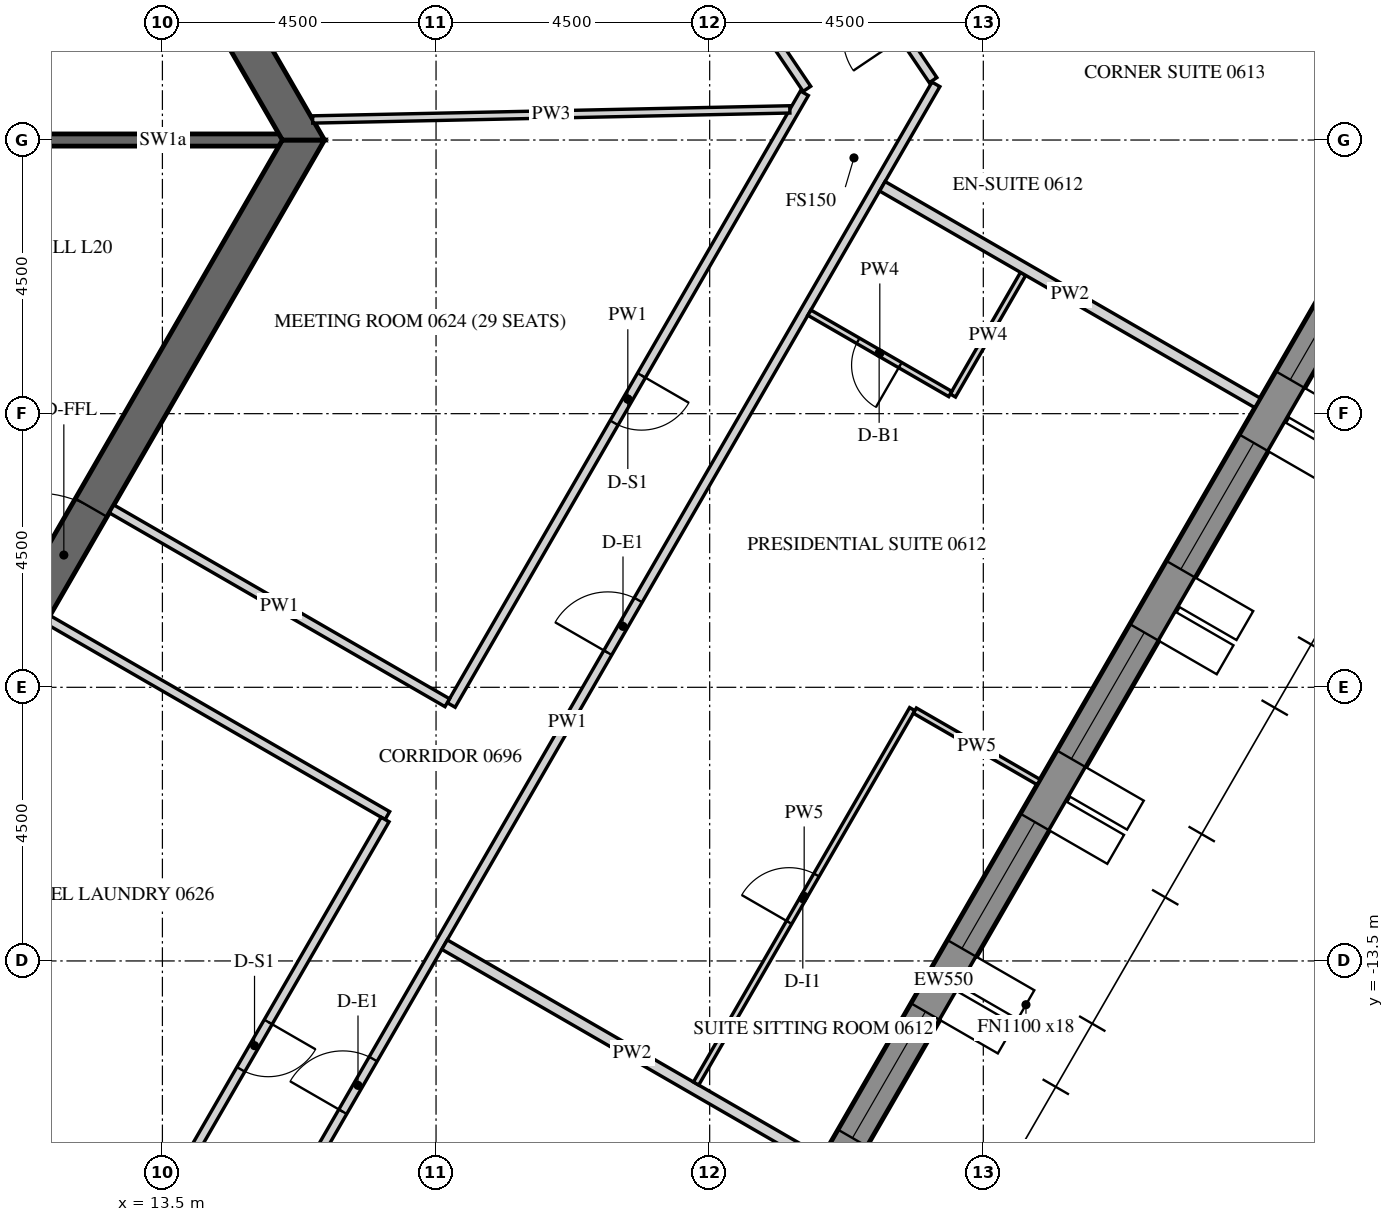
"""IFC4 building model, lengths in metres.
Left out: names, types, materials, properties, quantities, classifications, styles, units other than length and angle.
Written with IfcOpenShell. Run it as: python <this file> out.ifc"""

import sys

from ifc_helpers import new_model, si_unit, direction, frame, frame_2d, origin, place, context, subcontext, project, spatial, polyline, rectangle, outline, extrude, element, fill, save


model = new_model("IFC4")
c1 = context("Model", 3, precision=1e-05, world=origin(), true_north=direction((0.0, 1.0)))
c2 = subcontext(c1, "Body", "Model", "MODEL_VIEW")
j1 = project(units=[si_unit("LENGTHUNIT", "METRE"), si_unit("PLANEANGLEUNIT", "RADIAN")], contexts=[c1])
p1 = place(None, origin())
s1 = spatial("IfcSite", under=j1, at=p1, CompositionType="ELEMENT")
p2 = place(p1, origin())
s2 = spatial("IfcBuilding", under=s1, at=p2, CompositionType="ELEMENT")
p3 = place(p2, frame((0.0, 0.0, 92.1)))
s3 = spatial("IfcBuildingStorey", under=s2, at=p3, CompositionType="ELEMENT", Elevation=92.1)
p4 = place(p3, frame((18.83, -26.835, -0.15), z_axis=(0.0, 0.0, 1.0), x_axis=(0.500003800416, 0.866023209602, 0.0)))
e1 = element("IfcWall", 1, at=p4, inside=s3, PredefinedType="SOLIDWALL", context=c2, shape_type="SweptSolid", body=[
    extrude(outline(polyline([(-0.022, -0.275), (30.097, -0.275), (30.045, 0.275), (0.022, 0.275), (-0.022, -0.275)])), origin(), (0.0, 0.0, 1.0), 3.9),
])
p5 = place(p4, frame((1.236, 0.0, 1.05)))
e2 = element("IfcOpeningElement", 2, at=p5, cuts=e1, PredefinedType="OPENING", context=c2, shape_type="SweptSolid", body=[
    extrude(rectangle(XDim=2.4, YDim=2.4, at=frame_2d((1.2, 1.2))), frame((0.0, 0.285, 0.0), z_axis=(0.0, -1.0, 0.0), x_axis=(1.0, 0.0, 0.0)), (0.0, 0.0, 1.0), 0.57),
])
p6 = place(p4, frame((4.835, 0.0, 1.05)))
e3 = element("IfcOpeningElement", 3, at=p6, cuts=e1, PredefinedType="OPENING", context=c2, shape_type="SweptSolid", body=[
    extrude(rectangle(XDim=2.4, YDim=2.4, at=frame_2d((1.2, 1.2))), frame((0.0, 0.285, 0.0), z_axis=(0.0, -1.0, 0.0), x_axis=(1.0, 0.0, 0.0)), (0.0, 0.0, 1.0), 0.57),
])
p7 = place(p4, frame((8.436, 0.0, 1.05)))
e4 = element("IfcOpeningElement", 4, at=p7, cuts=e1, PredefinedType="OPENING", context=c2, shape_type="SweptSolid", body=[
    extrude(rectangle(XDim=2.4, YDim=2.4, at=frame_2d((1.2, 1.2))), frame((0.0, 0.285, 0.0), z_axis=(0.0, -1.0, 0.0), x_axis=(1.0, 0.0, 0.0)), (0.0, 0.0, 1.0), 0.57),
])
p8 = place(p4, frame((12.035, 0.0, 1.05)))
e5 = element("IfcOpeningElement", 5, at=p8, cuts=e1, PredefinedType="OPENING", context=c2, shape_type="SweptSolid", body=[
    extrude(rectangle(XDim=2.4, YDim=2.4, at=frame_2d((1.2, 1.2))), frame((0.0, 0.285, 0.0), z_axis=(0.0, -1.0, 0.0), x_axis=(1.0, 0.0, 0.0)), (0.0, 0.0, 1.0), 0.57),
])
p9 = place(p4, frame((15.635, 0.0, 1.05)))
e6 = element("IfcOpeningElement", 6, at=p9, cuts=e1, PredefinedType="OPENING", context=c2, shape_type="SweptSolid", body=[
    extrude(rectangle(XDim=2.4, YDim=2.4, at=frame_2d((1.2, 1.2))), frame((0.0, 0.285, 0.0), z_axis=(0.0, -1.0, 0.0), x_axis=(1.0, 0.0, 0.0)), (0.0, 0.0, 1.0), 0.57),
])
p10 = place(p4, frame((19.236, 0.0, 1.05)))
e7 = element("IfcOpeningElement", 7, at=p10, cuts=e1, PredefinedType="OPENING", context=c2, shape_type="SweptSolid", body=[
    extrude(rectangle(XDim=2.4, YDim=2.4, at=frame_2d((1.2, 1.2))), frame((0.0, 0.285, 0.0), z_axis=(0.0, -1.0, 0.0), x_axis=(1.0, 0.0, 0.0)), (0.0, 0.0, 1.0), 0.57),
])
p11 = place(p4, frame((22.835, 0.0, 1.05)))
e8 = element("IfcOpeningElement", 8, at=p11, cuts=e1, PredefinedType="OPENING", context=c2, shape_type="SweptSolid", body=[
    extrude(rectangle(XDim=2.4, YDim=2.4, at=frame_2d((1.2, 1.2))), frame((0.0, 0.285, 0.0), z_axis=(0.0, -1.0, 0.0), x_axis=(1.0, 0.0, 0.0)), (0.0, 0.0, 1.0), 0.57),
])
p12 = place(p4, frame((26.436, 0.0, 1.05)))
e9 = element("IfcOpeningElement", 9, at=p12, cuts=e1, PredefinedType="OPENING", context=c2, shape_type="SweptSolid", body=[
    extrude(rectangle(XDim=2.4, YDim=2.4, at=frame_2d((1.2, 1.2))), frame((0.0, 0.285, 0.0), z_axis=(0.0, -1.0, 0.0), x_axis=(1.0, 0.0, 0.0)), (0.0, 0.0, 1.0), 0.57),
])
p13 = place(p3, frame((7.91, -13.7, -0.15), z_axis=(0.0, 0.0, 1.0), x_axis=(0.499999880136, 0.866025472988, 0.0)))
e10 = element("IfcWall", 10, at=p13, inside=s3, PredefinedType="SHEAR", context=c2, shape_type="SweptSolid", body=[
    extrude(outline(polyline([(-0.173, -0.3), (15.993, -0.3), (15.646, 0.3), (0.173, 0.3), (-0.173, -0.3)])), origin(), (0.0, 0.0, 1.0), 3.9),
])
p14 = place(p13, frame((7.039, 0.0, 0.15)))
e11 = element("IfcOpeningElement", 11, at=p14, cuts=e10, PredefinedType="OPENING", context=c2, shape_type="SweptSolid", body=[
    extrude(rectangle(XDim=1.8, YDim=2.4, at=frame_2d((0.9, 1.2))), frame((0.0, 0.31, 0.0), z_axis=(0.0, -1.0, 0.0), x_axis=(1.0, 0.0, 0.0)), (0.0, 0.0, 1.0), 0.62),
])
p15 = place(p3, frame((15.819, 0.0, -0.15), z_axis=(0.0, 0.0, 1.0), x_axis=(-0.499999880136, 0.866025472988, 0.0)))
e12 = element("IfcWall", 12, at=p15, inside=s3, PredefinedType="SHEAR", context=c2, shape_type="SweptSolid", body=[
    extrude(outline(polyline([(-0.173, -0.3), (15.993, -0.3), (15.646, 0.3), (0.173, 0.3), (-0.173, -0.3)])), origin(), (0.0, 0.0, 1.0), 3.9),
])
p16 = place(p15, frame((6.981, 0.0, 0.15)))
e13 = element("IfcOpeningElement", 13, at=p16, cuts=e12, PredefinedType="OPENING", context=c2, shape_type="SweptSolid", body=[
    extrude(rectangle(XDim=1.8, YDim=2.4, at=frame_2d((0.9, 1.2))), frame((0.0, 0.31, 0.0), z_axis=(0.0, -1.0, 0.0), x_axis=(1.0, 0.0, 0.0)), (0.0, 0.0, 1.0), 0.62),
])
p17 = place(p3, frame((8.083, -14.0, -0.15), z_axis=(0.0, 0.0, 1.0), x_axis=(0.499997680643, -0.866026742862, 0.0)))
e14 = element("IfcWall", 14, at=p17, inside=s3, PredefinedType="SHEAR", context=c2, shape_type="SweptSolid", body=[
    extrude(rectangle(XDim=16.509, YDim=0.6, at=frame_2d((8.254, 0.0))), origin(), (0.0, 0.0, 1.0), 3.9),
])
p18 = place(p17, frame((7.354, 0.0, 0.15)))
e15 = element("IfcOpeningElement", 15, at=p18, cuts=e14, PredefinedType="OPENING", context=c2, shape_type="SweptSolid", body=[
    extrude(rectangle(XDim=1.8, YDim=2.4, at=frame_2d((0.9, 1.2))), frame((0.0, 0.31, 0.0), z_axis=(0.0, -1.0, 0.0), x_axis=(1.0, 0.0, 0.0)), (0.0, 0.0, 1.0), 0.62),
])
p19 = place(p3, frame((11.547, 0.0, -0.15), z_axis=(0.0, 0.0, 1.0), x_axis=(1.0, 0.0, 0.0)))
e16 = element("IfcWall", 16, at=p19, inside=s3, PredefinedType="SHEAR", context=c2, shape_type="SweptSolid", body=[
    extrude(rectangle(XDim=3.926, YDim=0.2, at=frame_2d((1.963, 0.0))), origin(), (0.0, 0.0, 1.0), 3.9),
])
p20 = place(p3, frame((14.102, -20.075, 0.0), z_axis=(0.0, 0.0, 1.0), x_axis=(0.499996816197, 0.866027241946, 0.0)))
e17 = element("IfcWall", 17, at=p20, inside=s3, PredefinedType="PARTITIONING", context=c2, shape_type="SweptSolid", body=[
    extrude(rectangle(XDim=24.238, YDim=0.15, at=frame_2d((12.119, 0.0))), origin(), (0.0, 0.0, 1.0), 2.988),
])
p21 = place(p20, frame((4.729, 0.0, 0.0)))
e18 = element("IfcOpeningElement", 18, at=p21, cuts=e17, PredefinedType="OPENING", context=c2, shape_type="SweptSolid", body=[
    extrude(rectangle(XDim=1.0, YDim=2.1, at=frame_2d((0.5, 1.05))), frame((0.0, 0.085, 0.0), z_axis=(0.0, -1.0, 0.0), x_axis=(1.0, 0.0, 0.0)), (0.0, 0.0, 1.0), 0.17),
])
p22 = place(p20, frame((13.446, 0.0, 0.0)))
e19 = element("IfcOpeningElement", 19, at=p22, cuts=e17, PredefinedType="OPENING", context=c2, shape_type="SweptSolid", body=[
    extrude(rectangle(XDim=1.0, YDim=2.1, at=frame_2d((0.5, 1.05))), frame((0.0, 0.085, 0.0), z_axis=(0.0, -1.0, 0.0), x_axis=(1.0, 0.0, 0.0)), (0.0, 0.0, 1.0), 0.17),
])
p23 = place(p3, frame((26.174, 0.985, 0.0), z_axis=(0.0, 0.0, 1.0), x_axis=(-0.559199676409, 0.82903300411, 0.0)))
e20 = element("IfcWall", 20, at=p23, inside=s3, PredefinedType="PARTITIONING", context=c2, shape_type="SweptSolid", body=[
    extrude(rectangle(XDim=22.335, YDim=0.15, at=frame_2d((11.168, 0.0))), origin(), (0.0, 0.0, 1.0), 2.988),
])
p24 = place(p23, frame((0.863, 0.0, 0.0)))
e21 = element("IfcOpeningElement", 21, at=p24, cuts=e20, PredefinedType="OPENING", context=c2, shape_type="SweptSolid", body=[
    extrude(rectangle(XDim=1.0, YDim=2.1, at=frame_2d((0.5, 1.05))), frame((0.0, 0.085, 0.0), z_axis=(0.0, -1.0, 0.0), x_axis=(1.0, 0.0, 0.0)), (0.0, 0.0, 1.0), 0.17),
])
p25 = place(p23, frame((10.909, 0.0, 0.0)))
e22 = element("IfcOpeningElement", 22, at=p25, cuts=e20, PredefinedType="OPENING", context=c2, shape_type="SweptSolid", body=[
    extrude(rectangle(XDim=1.0, YDim=2.1, at=frame_2d((0.5, 1.05))), frame((0.0, 0.085, 0.0), z_axis=(0.0, -1.0, 0.0), x_axis=(1.0, 0.0, 0.0)), (0.0, 0.0, 1.0), 0.17),
])
p26 = place(p3, frame((24.058, 0.769, 0.0), z_axis=(0.0, 0.0, 1.0), x_axis=(-0.499995346943, -0.866028090212, 0.0)))
e23 = element("IfcWall", 23, at=p26, inside=s3, PredefinedType="PARTITIONING", context=c2, shape_type="SweptSolid", body=[
    extrude(rectangle(XDim=11.616, YDim=0.15, at=frame_2d((5.808, 0.0))), origin(), (0.0, 0.0, 1.0), 2.988),
])
p27 = place(p26, frame((5.358, 0.0, 0.0)))
e24 = element("IfcOpeningElement", 24, at=p27, cuts=e23, PredefinedType="OPENING", context=c2, shape_type="SweptSolid", body=[
    extrude(rectangle(XDim=0.9, YDim=2.1, at=frame_2d((0.45, 1.05))), frame((0.0, 0.085, 0.0), z_axis=(0.0, -1.0, 0.0), x_axis=(1.0, 0.0, 0.0)), (0.0, 0.0, 1.0), 0.17),
])
p28 = place(p3, frame((18.185, -9.253, 0.0), z_axis=(0.0, 0.0, 1.0), x_axis=(-0.866028703517, 0.499994284652, 0.0)))
e25 = element("IfcWall", 25, at=p28, inside=s3, PredefinedType="PARTITIONING", context=c2, shape_type="SweptSolid", body=[
    extrude(rectangle(XDim=6.375, YDim=0.15, at=frame_2d((3.188, 0.0))), origin(), (0.0, 0.0, 1.0), 2.988),
])
p29 = place(p3, frame((18.4, 9.291, 0.0), z_axis=(0.0, 0.0, 1.0), x_axis=(0.559191829043, -0.829038297265, 0.0)))
e26 = element("IfcWall", 26, at=p29, inside=s3, PredefinedType="PARTITIONING", context=c2, shape_type="SweptSolid", body=[
    extrude(rectangle(XDim=10.192, YDim=0.15, at=frame_2d((5.096, 0.0))), origin(), (0.0, 0.0, 1.0), 2.988),
])
p30 = place(p29, frame((4.646, 0.0, 0.0)))
e27 = element("IfcOpeningElement", 27, at=p30, cuts=e26, PredefinedType="OPENING", context=c2, shape_type="SweptSolid", body=[
    extrude(rectangle(XDim=0.9, YDim=2.1, at=frame_2d((0.45, 1.05))), frame((0.0, 0.085, 0.0), z_axis=(0.0, -1.0, 0.0), x_axis=(1.0, 0.0, 0.0)), (0.0, 0.0, 1.0), 0.17),
])
p31 = place(p3, frame((11.614, -7.884, 0.0), z_axis=(0.0, 0.0, 1.0), x_axis=(0.866021702275, -0.500006411147, 0.0)))
e28 = element("IfcWall", 28, at=p31, inside=s3, PredefinedType="PARTITIONING", context=c2, shape_type="SweptSolid", body=[
    extrude(rectangle(XDim=6.45, YDim=0.15, at=frame_2d((3.225, 0.0))), origin(), (0.0, 0.0, 1.0), 2.988),
])
p32 = place(p3, frame((17.162, -11.174, 0.0), z_axis=(0.0, 0.0, 1.0), x_axis=(-0.499997214665, -0.866027011893, 0.0)))
e29 = element("IfcWall", 29, at=p32, inside=s3, PredefinedType="PARTITIONING", context=c2, shape_type="SweptSolid", body=[
    extrude(rectangle(XDim=8.589, YDim=0.15, at=frame_2d((4.294, 0.0))), origin(), (0.0, 0.0, 1.0), 2.988),
])
p33 = place(p32, frame((3.844, 0.0, 0.0)))
e30 = element("IfcOpeningElement", 30, at=p33, cuts=e29, PredefinedType="OPENING", context=c2, shape_type="SweptSolid", body=[
    extrude(rectangle(XDim=0.9, YDim=2.1, at=frame_2d((0.45, 1.05))), frame((0.0, 0.085, 0.0), z_axis=(0.0, -1.0, 0.0), x_axis=(1.0, 0.0, 0.0)), (0.0, 0.0, 1.0), 0.17),
])
p34 = place(p3, frame((24.31, -16.794, 0.0), z_axis=(0.0, 0.0, 1.0), x_axis=(-0.866024672353, 0.500001266874, 0.0)))
e31 = element("IfcWall", 31, at=p34, inside=s3, PredefinedType="PARTITIONING", context=c2, shape_type="SweptSolid", body=[
    extrude(rectangle(XDim=7.125, YDim=0.18, at=frame_2d((3.562, 0.0))), origin(), (0.0, 0.0, 1.0), 2.988),
])
p35 = place(p3, frame((27.655, -2.201, 0.0), z_axis=(0.0, 0.0, 1.0), x_axis=(-0.500015210774, -0.866016621662, 0.0)))
e32 = element("IfcWall", 32, at=p35, inside=s3, PredefinedType="PARTITIONING", context=c2, shape_type="SweptSolid", body=[
    extrude(rectangle(XDim=2.31, YDim=0.1, at=frame_2d((1.155, 0.0))), origin(), (0.0, 0.0, 1.0), 2.988),
])
p36 = place(p3, frame((26.456, -4.177, 0.0), z_axis=(0.0, 0.0, 1.0), x_axis=(-0.866021425885, 0.500006889861, 0.0)))
e33 = element("IfcWall", 33, at=p36, inside=s3, PredefinedType="PARTITIONING", context=c2, shape_type="SweptSolid", body=[
    extrude(rectangle(XDim=2.675, YDim=0.1, at=frame_2d((1.337, 0.0))), origin(), (0.0, 0.0, 1.0), 2.988),
])
p37 = place(p36, frame((0.95, 0.0, 0.0)))
e34 = element("IfcOpeningElement", 34, at=p37, cuts=e33, PredefinedType="OPENING", context=c2, shape_type="SweptSolid", body=[
    extrude(rectangle(XDim=0.8, YDim=2.1, at=frame_2d((0.4, 1.05))), frame((0.0, 0.06, 0.0), z_axis=(0.0, -1.0, 0.0), x_axis=(1.0, 0.0, 0.0)), (0.0, 0.0, 1.0), 0.12),
])
p38 = place(p3, frame((22.277, -15.516, 0.0), z_axis=(0.0, 0.0, 1.0), x_axis=(0.499990956993, 0.866030624704, 0.0)))
e35 = element("IfcWall", 35, at=p38, inside=s3, PredefinedType="PARTITIONING", context=c2, shape_type="SweptSolid", body=[
    extrude(rectangle(XDim=7.11, YDim=0.1, at=frame_2d((3.555, 0.0))), origin(), (0.0, 0.0, 1.0), 2.988),
])
p39 = place(p38, frame((3.06, 0.0, 0.0)))
e36 = element("IfcOpeningElement", 36, at=p39, cuts=e35, PredefinedType="OPENING", context=c2, shape_type="SweptSolid", body=[
    extrude(rectangle(XDim=0.9, YDim=2.1, at=frame_2d((0.45, 1.05))), frame((0.0, 0.06, 0.0), z_axis=(0.0, -1.0, 0.0), x_axis=(1.0, 0.0, 0.0)), (0.0, 0.0, 1.0), 0.12),
])
p40 = place(p3, frame((25.875, -9.384, 0.0), z_axis=(0.0, 0.0, 1.0), x_axis=(0.866016039709, -0.500016218704, 0.0)))
e37 = element("IfcWall", 37, at=p40, inside=s3, PredefinedType="PARTITIONING", context=c2, shape_type="SweptSolid", body=[
    extrude(rectangle(XDim=2.35, YDim=0.1, at=frame_2d((1.175, 0.0))), origin(), (0.0, 0.0, 1.0), 2.988),
])
p41 = place(p3, frame((31.51, -4.323, 0.0), z_axis=(0.0, 0.0, 1.0), x_axis=(-0.866039509621, 0.499975567179, 0.0)))
e38 = element("IfcWall", 38, at=p41, inside=s3, PredefinedType="PARTITIONING", context=c2, shape_type="SweptSolid", body=[
    extrude(rectangle(XDim=7.125, YDim=0.18, at=frame_2d((3.562, 0.0))), origin(), (0.0, 0.0, 1.0), 2.988),
])
p42 = place(p3, frame((23.818, 0.504, 0.0), z_axis=(0.0, 0.0, 1.0), x_axis=(-0.999776284395, -0.021151386765, 0.0)))
e39 = element("IfcWall", 39, at=p42, inside=s3, PredefinedType="PARTITIONING", context=c2, shape_type="SweptSolid", body=[
    extrude(rectangle(XDim=7.849, YDim=0.12, at=frame_2d((3.924, 0.0))), origin(), (0.0, 0.0, 1.0), 2.988),
])
p43 = place(p8, frame((0.0, 0.205, 0.0)))
e40 = element("IfcWindow", 40, at=p43, inside=s3, PartitioningType="DOUBLE_PANEL_VERTICAL", PredefinedType="WINDOW", context=c2, shape_type="SweptSolid", body=[
    extrude(rectangle(XDim=2.4, YDim=2.4, at=frame_2d((1.2, 1.2))), frame((0.0, 0.03, 0.0), z_axis=(0.0, -1.0, 0.0), x_axis=(1.0, 0.0, 0.0)), (0.0, 0.0, 1.0), 0.06),
])
fill(e5, e40)
p44 = place(p9, frame((0.0, 0.205, 0.0)))
e41 = element("IfcWindow", 41, at=p44, inside=s3, PartitioningType="DOUBLE_PANEL_VERTICAL", PredefinedType="WINDOW", context=c2, shape_type="SweptSolid", body=[
    extrude(rectangle(XDim=2.4, YDim=2.4, at=frame_2d((1.2, 1.2))), frame((0.0, 0.03, 0.0), z_axis=(0.0, -1.0, 0.0), x_axis=(1.0, 0.0, 0.0)), (0.0, 0.0, 1.0), 0.06),
])
fill(e6, e41)
p45 = place(p10, frame((0.0, 0.205, 0.0)))
e42 = element("IfcWindow", 42, at=p45, inside=s3, PartitioningType="DOUBLE_PANEL_VERTICAL", PredefinedType="WINDOW", context=c2, shape_type="SweptSolid", body=[
    extrude(rectangle(XDim=2.4, YDim=2.4, at=frame_2d((1.2, 1.2))), frame((0.0, 0.03, 0.0), z_axis=(0.0, -1.0, 0.0), x_axis=(1.0, 0.0, 0.0)), (0.0, 0.0, 1.0), 0.06),
])
fill(e7, e42)
p46 = place(p11, frame((0.0, 0.205, 0.0)))
e43 = element("IfcWindow", 43, at=p46, inside=s3, PartitioningType="DOUBLE_PANEL_VERTICAL", PredefinedType="WINDOW", context=c2, shape_type="SweptSolid", body=[
    extrude(rectangle(XDim=2.4, YDim=2.4, at=frame_2d((1.2, 1.2))), frame((0.0, 0.03, 0.0), z_axis=(0.0, -1.0, 0.0), x_axis=(1.0, 0.0, 0.0)), (0.0, 0.0, 1.0), 0.06),
])
fill(e8, e43)
p47 = place(p12, frame((0.0, 0.205, 0.0)))
e44 = element("IfcWindow", 44, at=p47, inside=s3, PartitioningType="DOUBLE_PANEL_VERTICAL", PredefinedType="WINDOW", context=c2, shape_type="SweptSolid", body=[
    extrude(rectangle(XDim=2.4, YDim=2.4, at=frame_2d((1.2, 1.2))), frame((0.0, 0.03, 0.0), z_axis=(0.0, -1.0, 0.0), x_axis=(1.0, 0.0, 0.0)), (0.0, 0.0, 1.0), 0.06),
])
fill(e9, e44)
p48 = place(p14, origin())
e45 = element("IfcDoor", 45, at=p48, inside=s3, OperationType="DOUBLE_DOOR_SINGLE_SWING", PredefinedType="DOOR", context=c2, shape_type="SweptSolid", body=[
    extrude(rectangle(XDim=1.8, YDim=2.4, at=frame_2d((0.9, 1.2))), frame((0.0, 0.025, 0.0), z_axis=(0.0, -1.0, 0.0), x_axis=(1.0, 0.0, 0.0)), (0.0, 0.0, 1.0), 0.05),
])
fill(e11, e45)
p49 = place(p21, origin())
e46 = element("IfcDoor", 46, at=p49, inside=s3, OperationType="SINGLE_SWING_LEFT", PredefinedType="DOOR", context=c2, shape_type="SweptSolid", body=[
    extrude(rectangle(XDim=1.0, YDim=2.1, at=frame_2d((0.5, 1.05))), frame((0.0, 0.025, 0.0), z_axis=(0.0, -1.0, 0.0), x_axis=(1.0, 0.0, 0.0)), (0.0, 0.0, 1.0), 0.05),
])
fill(e18, e46)
p50 = place(p22, origin())
e47 = element("IfcDoor", 47, at=p50, inside=s3, OperationType="SINGLE_SWING_RIGHT", PredefinedType="DOOR", context=c2, shape_type="SweptSolid", body=[
    extrude(rectangle(XDim=1.0, YDim=2.1, at=frame_2d((0.5, 1.05))), frame((0.0, 0.025, 0.0), z_axis=(0.0, -1.0, 0.0), x_axis=(1.0, 0.0, 0.0)), (0.0, 0.0, 1.0), 0.05),
])
fill(e19, e47)
p51 = place(p37, origin())
e48 = element("IfcDoor", 48, at=p51, inside=s3, OperationType="SINGLE_SWING_RIGHT", PredefinedType="DOOR", context=c2, shape_type="SweptSolid", body=[
    extrude(rectangle(XDim=0.8, YDim=2.1, at=frame_2d((0.4, 1.05))), frame((0.0, 0.025, 0.0), z_axis=(0.0, -1.0, 0.0), x_axis=(1.0, 0.0, 0.0)), (0.0, 0.0, 1.0), 0.05),
])
fill(e34, e48)
p52 = place(p39, origin())
e49 = element("IfcDoor", 49, at=p52, inside=s3, OperationType="SINGLE_SWING_RIGHT", PredefinedType="DOOR", context=c2, shape_type="SweptSolid", body=[
    extrude(rectangle(XDim=0.9, YDim=2.1, at=frame_2d((0.45, 1.05))), frame((0.0, 0.025, 0.0), z_axis=(0.0, -1.0, 0.0), x_axis=(1.0, 0.0, 0.0)), (0.0, 0.0, 1.0), 0.05),
])
fill(e36, e49)
p53 = place(p27, origin())
e50 = element("IfcDoor", 50, at=p53, inside=s3, OperationType="SINGLE_SWING_RIGHT", PredefinedType="DOOR", context=c2, shape_type="SweptSolid", body=[
    extrude(rectangle(XDim=0.9, YDim=2.1, at=frame_2d((0.45, 1.05))), frame((0.0, 0.025, 0.0), z_axis=(0.0, -1.0, 0.0), x_axis=(1.0, 0.0, 0.0)), (0.0, 0.0, 1.0), 0.05),
])
fill(e24, e50)
p54 = place(p33, origin())
e51 = element("IfcDoor", 51, at=p54, inside=s3, OperationType="SINGLE_SWING_LEFT", PredefinedType="DOOR", context=c2, shape_type="SweptSolid", body=[
    extrude(rectangle(XDim=0.9, YDim=2.1, at=frame_2d((0.45, 1.05))), frame((0.0, 0.025, 0.0), z_axis=(0.0, -1.0, 0.0), x_axis=(1.0, 0.0, 0.0)), (0.0, 0.0, 1.0), 0.05),
])
fill(e30, e51)
save(model, sys.argv[1])
